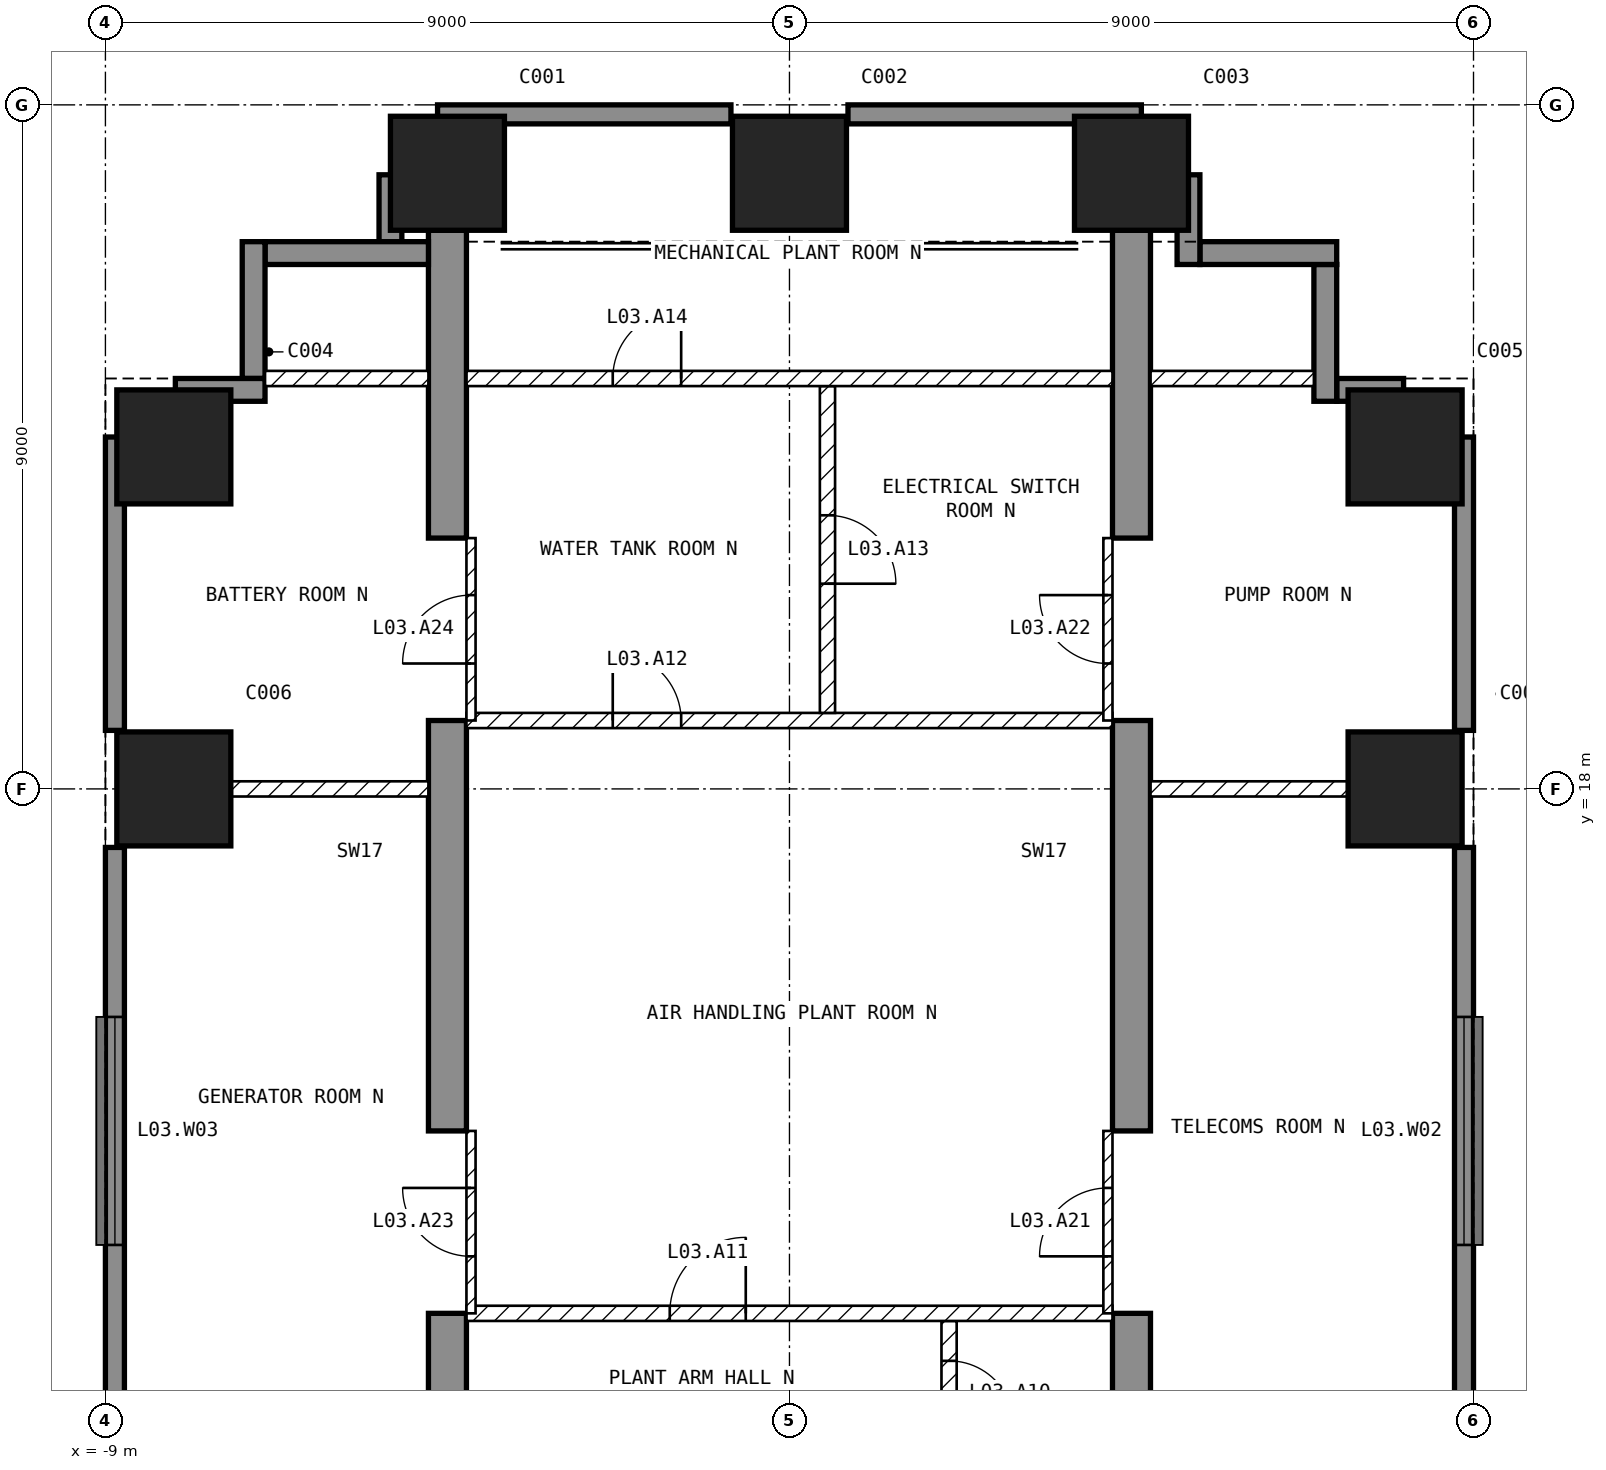
"""IFC4 building model, lengths in metres.
Left out: names, types, materials, properties, quantities, classifications, styles, units other than length and angle.
Written with IfcOpenShell. Run it as: python <this file> out.ifc"""

import sys

from ifc_helpers import new_model, si_unit, direction, frame, frame_2d, origin, origin_2d, place, context, subcontext, project, spatial, polyline, rectangle, outline, extrude, element, fill, save


model = new_model("IFC4")
c1 = context("Model", 3, precision=1e-05, world=origin(), true_north=direction((0.0, 1.0)))
c2 = subcontext(c1, "Body", "Model", "MODEL_VIEW")
j1 = project(units=[si_unit("LENGTHUNIT", "METRE"), si_unit("PLANEANGLEUNIT", "RADIAN")], contexts=[c1])
p1 = place(None, origin())
s1 = spatial("IfcSite", under=j1, at=p1, CompositionType="ELEMENT")
p2 = place(p1, origin())
s2 = spatial("IfcBuilding", under=s1, at=p2, CompositionType="ELEMENT")
p3 = place(p2, frame((0.0, 0.0, 27.0)))
s3 = spatial("IfcBuildingStorey", under=s2, at=p3, CompositionType="ELEMENT", Elevation=27.0)
for number, where, z_axis, x_axis in (
    (1, (-8.1, 18.0, -0.45), (0.0, 0.0, 1.0), (1.0, 0.0, 0.0)),
    (2, (-8.1, 22.5, -0.45), (0.0, 0.0, 1.0), (1.0, 0.0, 0.0)),
    (3, (-4.5, 26.1, -0.45), (0.0, 0.0, 1.0), (1.0, 0.0, 0.0)),
    (4, (0.0, 26.1, -0.45), (0.0, 0.0, 1.0), (1.0, 0.0, 0.0)),
    (5, (4.5, 26.1, -0.45), (0.0, 0.0, 1.0), (1.0, 0.0, 0.0)),
    (6, (8.1, 18.0, -0.45), (0.0, 0.0, 1.0), (1.0, 0.0, 0.0)),
    (7, (8.1, 22.5, -0.45), (0.0, 0.0, 1.0), (1.0, 0.0, 0.0)),
):
    element("IfcColumn", number, at=place(p3, frame(where, z_axis=z_axis, x_axis=x_axis)), inside=s3, PredefinedType="COLUMN", context=c2, shape_type="SweptSolid", body=[
        extrude(rectangle(XDim=1.5, YDim=1.5, at=origin_2d()), origin(), (0.0, 0.0, 1.0), 5.15),
    ])
for number, where, z_axis, x_axis in (
    (8, (-4.75, 9.0, -0.45), (1.0, 0.0, 0.0), (0.0, 1.0, 0.0)),
    (9, (4.25, 9.0, -0.45), (1.0, 0.0, 0.0), (0.0, 1.0, 0.0)),
):
    element("IfcWall", number, at=place(p3, frame(where, z_axis=z_axis, x_axis=x_axis)), inside=s3, PredefinedType="SHEAR", context=c2, shape_type="SweptSolid", body=[
        extrude(outline(polyline([(0.0, 0.0), (2.1, 0.0), (2.1, 2.85), (4.5, 2.85), (4.5, 0.0), (9.9, 0.0), (9.9, 2.85), (12.3, 2.85), (12.3, 0.0), (16.35, 0.0), (16.35, 5.15), (0.0, 5.15), (0.0, 0.0)])), origin(), (0.0, 0.0, 1.0), 0.5),
    ])
p4 = place(p3, frame((8.875, 9.77, 0.0), z_axis=(0.0, 0.0, 1.0), x_axis=(0.0, 1.0, 0.0)))
e10 = element("IfcWall", 10, at=p4, inside=s3, PredefinedType="SOLIDWALL", context=c2, shape_type="SweptSolid", body=[
    extrude(rectangle(XDim=7.46, YDim=0.25, at=frame_2d((3.73, 0.0))), origin(), (0.0, 0.0, 1.0), 4.7),
])
p5 = place(p4, frame((2.23, 0.0, 1.0)))
e11 = element("IfcOpeningElement", 11, at=p5, cuts=e10, PredefinedType="OPENING", context=c2, shape_type="SweptSolid", body=[
    extrude(rectangle(XDim=3.0, YDim=2.4, at=frame_2d((1.5, 1.2))), frame((0.0, 0.135, 0.0), z_axis=(0.0, -1.0, 0.0), x_axis=(1.0, 0.0, 0.0)), (0.0, 0.0, 1.0), 0.27),
])
for number, where, z_axis, x_axis in (
    (12, (8.875, 18.77, 0.0), (0.0, 0.0, 1.0), (0.0, 1.0, 0.0)),
    (13, (4.63, 26.875, 0.0), (0.0, 0.0, 1.0), (-1.0, 0.0, 0.0)),
    (14, (-0.77, 26.875, 0.0), (0.0, 0.0, 1.0), (-1.0, 0.0, 0.0)),
    (15, (-8.875, 22.63, 0.0), (0.0, 0.0, 1.0), (0.0, -1.0, 0.0)),
):
    element("IfcWall", number, at=place(p3, frame(where, z_axis=z_axis, x_axis=x_axis)), inside=s3, PredefinedType="SOLIDWALL", context=c2, shape_type="SweptSolid", body=[
        extrude(rectangle(XDim=3.86, YDim=0.25, at=frame_2d((1.93, 0.0))), origin(), (0.0, 0.0, 1.0), 4.7),
    ])
p6 = place(p3, frame((-8.875, 17.23, 0.0), z_axis=(0.0, 0.0, 1.0), x_axis=(0.0, -1.0, 0.0)))
e16 = element("IfcWall", 16, at=p6, inside=s3, PredefinedType="SOLIDWALL", context=c2, shape_type="SweptSolid", body=[
    extrude(rectangle(XDim=7.46, YDim=0.25, at=frame_2d((3.73, 0.0))), origin(), (0.0, 0.0, 1.0), 4.7),
])
p7 = place(p6, frame((2.23, 0.0, 1.0)))
e17 = element("IfcOpeningElement", 17, at=p7, cuts=e16, PredefinedType="OPENING", context=c2, shape_type="SweptSolid", body=[
    extrude(rectangle(XDim=3.0, YDim=2.4, at=frame_2d((1.5, 1.2))), frame((0.0, 0.135, 0.0), z_axis=(0.0, -1.0, 0.0), x_axis=(1.0, 0.0, 0.0)), (0.0, 0.0, 1.0), 0.27),
])
p8 = place(p3, frame((8.08, 23.25, 0.0), z_axis=(0.0, 0.0, 1.0), x_axis=(-1.0, 0.0, 0.0)))
e18 = element("IfcWall", 18, at=p8, inside=s3, PredefinedType="SOLIDWALL", context=c2, shape_type="SweptSolid", body=[
    extrude(rectangle(XDim=0.88, YDim=0.3, at=frame_2d((0.44, 0.0))), origin(), (0.0, 0.0, 1.0), 4.7),
])
p9 = place(p3, frame((7.05, 23.1, 0.0), z_axis=(0.0, 0.0, 1.0), x_axis=(0.0, 1.0, 0.0)))
e19 = element("IfcWall", 19, at=p9, inside=s3, PredefinedType="SOLIDWALL", context=c2, shape_type="SweptSolid", body=[
    extrude(rectangle(XDim=1.8, YDim=0.3, at=frame_2d((0.9, 0.0))), origin(), (0.0, 0.0, 1.0), 4.7),
])
p10 = place(p3, frame((7.2, 25.05, 0.0), z_axis=(0.0, 0.0, 1.0), x_axis=(-1.0, 0.0, 0.0)))
e20 = element("IfcWall", 20, at=p10, inside=s3, PredefinedType="SOLIDWALL", context=c2, shape_type="SweptSolid", body=[
    extrude(rectangle(XDim=1.8, YDim=0.3, at=frame_2d((0.9, 0.0))), origin(), (0.0, 0.0, 1.0), 4.7),
])
p11 = place(p3, frame((5.25, 24.9, 0.0), z_axis=(0.0, 0.0, 1.0), x_axis=(0.0, 1.0, 0.0)))
e21 = element("IfcWall", 21, at=p11, inside=s3, PredefinedType="SOLIDWALL", context=c2, shape_type="SweptSolid", body=[
    extrude(rectangle(XDim=1.18, YDim=0.3, at=frame_2d((0.59, 0.0))), origin(), (0.0, 0.0, 1.0), 4.7),
])
p12 = place(p3, frame((-5.25, 26.08, 0.0), z_axis=(0.0, 0.0, 1.0), x_axis=(0.0, -1.0, 0.0)))
e22 = element("IfcWall", 22, at=p12, inside=s3, PredefinedType="SOLIDWALL", context=c2, shape_type="SweptSolid", body=[
    extrude(rectangle(XDim=0.88, YDim=0.3, at=frame_2d((0.44, 0.0))), origin(), (0.0, 0.0, 1.0), 4.7),
])
p13 = place(p3, frame((-4.75, 25.05, 0.0), z_axis=(0.0, 0.0, 1.0), x_axis=(-1.0, 0.0, 0.0)))
e23 = element("IfcWall", 23, at=p13, inside=s3, PredefinedType="SOLIDWALL", context=c2, shape_type="SweptSolid", body=[
    extrude(rectangle(XDim=2.15, YDim=0.3, at=frame_2d((1.075, 0.0))), origin(), (0.0, 0.0, 1.0), 4.7),
])
p14 = place(p3, frame((-7.05, 25.2, 0.0), z_axis=(0.0, 0.0, 1.0), x_axis=(0.0, -1.0, 0.0)))
e24 = element("IfcWall", 24, at=p14, inside=s3, PredefinedType="SOLIDWALL", context=c2, shape_type="SweptSolid", body=[
    extrude(rectangle(XDim=1.8, YDim=0.3, at=frame_2d((0.9, 0.0))), origin(), (0.0, 0.0, 1.0), 4.7),
])
p15 = place(p3, frame((-6.9, 23.25, 0.0), z_axis=(0.0, 0.0, 1.0), x_axis=(-1.0, 0.0, 0.0)))
e25 = element("IfcWall", 25, at=p15, inside=s3, PredefinedType="SOLIDWALL", context=c2, shape_type="SweptSolid", body=[
    extrude(rectangle(XDim=1.18, YDim=0.3, at=frame_2d((0.59, 0.0))), origin(), (0.0, 0.0, 1.0), 4.7),
])
p16 = place(p3, frame((2.1, 11.0, 0.0), z_axis=(0.0, 0.0, 1.0), x_axis=(0.0, -1.0, 0.0)))
e26 = element("IfcWall", 26, at=p16, inside=s3, PredefinedType="PARTITIONING", context=c2, shape_type="SweptSolid", body=[
    extrude(rectangle(XDim=1.9, YDim=0.2, at=frame_2d((0.95, 0.0))), origin(), (0.0, 0.0, 1.0), 4.7),
])
p17 = place(p16, frame((0.525, 0.0, 0.0)))
e27 = element("IfcOpeningElement", 27, at=p17, cuts=e26, PredefinedType="OPENING", context=c2, shape_type="SweptSolid", body=[
    extrude(rectangle(XDim=0.85, YDim=2.1, at=frame_2d((0.425, 1.05))), frame((0.0, 0.11, 0.0), z_axis=(0.0, -1.0, 0.0), x_axis=(1.0, 0.0, 0.0)), (0.0, 0.0, 1.0), 0.22),
])
p18 = place(p3, frame((-4.25, 11.1, 0.0), z_axis=(0.0, 0.0, 1.0), x_axis=(1.0, 0.0, 0.0)))
e28 = element("IfcWall", 28, at=p18, inside=s3, PredefinedType="PARTITIONING", context=c2, shape_type="SweptSolid", body=[
    extrude(rectangle(XDim=8.5, YDim=0.2, at=frame_2d((4.25, 0.0))), origin(), (0.0, 0.0, 1.0), 4.7),
])
p19 = place(p18, frame((2.675, 0.0, 0.0)))
e29 = element("IfcOpeningElement", 29, at=p19, cuts=e28, PredefinedType="OPENING", context=c2, shape_type="SweptSolid", body=[
    extrude(rectangle(XDim=1.0, YDim=2.1, at=frame_2d((0.5, 1.05))), frame((0.0, 0.11, 0.0), z_axis=(0.0, -1.0, 0.0), x_axis=(1.0, 0.0, 0.0)), (0.0, 0.0, 1.0), 0.22),
])
p20 = place(p3, frame((-4.25, 18.9, 0.0), z_axis=(0.0, 0.0, 1.0), x_axis=(1.0, 0.0, 0.0)))
e30 = element("IfcWall", 30, at=p20, inside=s3, PredefinedType="PARTITIONING", context=c2, shape_type="SweptSolid", body=[
    extrude(rectangle(XDim=8.5, YDim=0.2, at=frame_2d((4.25, 0.0))), origin(), (0.0, 0.0, 1.0), 4.7),
])
p21 = place(p20, frame((1.925, 0.0, 0.0)))
e31 = element("IfcOpeningElement", 31, at=p21, cuts=e30, PredefinedType="OPENING", context=c2, shape_type="SweptSolid", body=[
    extrude(rectangle(XDim=0.9, YDim=2.1, at=frame_2d((0.45, 1.05))), frame((0.0, 0.11, 0.0), z_axis=(0.0, -1.0, 0.0), x_axis=(1.0, 0.0, 0.0)), (0.0, 0.0, 1.0), 0.22),
])
p22 = place(p3, frame((0.5, 23.3, 0.0), z_axis=(0.0, 0.0, 1.0), x_axis=(0.0, -1.0, 0.0)))
e32 = element("IfcWall", 32, at=p22, inside=s3, PredefinedType="PARTITIONING", context=c2, shape_type="SweptSolid", body=[
    extrude(rectangle(XDim=4.3, YDim=0.2, at=frame_2d((2.15, 0.0))), origin(), (0.0, 0.0, 1.0), 4.7),
])
p23 = place(p22, frame((1.7, 0.0, 0.0)))
e33 = element("IfcOpeningElement", 33, at=p23, cuts=e32, PredefinedType="OPENING", context=c2, shape_type="SweptSolid", body=[
    extrude(rectangle(XDim=0.9, YDim=2.1, at=frame_2d((0.45, 1.05))), frame((0.0, 0.11, 0.0), z_axis=(0.0, -1.0, 0.0), x_axis=(1.0, 0.0, 0.0)), (0.0, 0.0, 1.0), 0.22),
])
p24 = place(p3, frame((-4.25, 23.4, 0.0), z_axis=(0.0, 0.0, 1.0), x_axis=(1.0, 0.0, 0.0)))
e34 = element("IfcWall", 34, at=p24, inside=s3, PredefinedType="PARTITIONING", context=c2, shape_type="SweptSolid", body=[
    extrude(rectangle(XDim=8.5, YDim=0.2, at=frame_2d((4.25, 0.0))), origin(), (0.0, 0.0, 1.0), 4.7),
])
p25 = place(p24, frame((1.925, 0.0, 0.0)))
e35 = element("IfcOpeningElement", 35, at=p25, cuts=e34, PredefinedType="OPENING", context=c2, shape_type="SweptSolid", body=[
    extrude(rectangle(XDim=0.9, YDim=2.1, at=frame_2d((0.45, 1.05))), frame((0.0, 0.11, 0.0), z_axis=(0.0, -1.0, 0.0), x_axis=(1.0, 0.0, 0.0)), (0.0, 0.0, 1.0), 0.22),
])
p26 = place(p3, frame((4.75, 18.0, 0.0), z_axis=(0.0, 0.0, 1.0), x_axis=(1.0, 0.0, 0.0)))
e36 = element("IfcWall", 36, at=p26, inside=s3, PredefinedType="PARTITIONING", context=c2, shape_type="SweptSolid", body=[
    extrude(rectangle(XDim=2.6, YDim=0.2, at=frame_2d((1.3, 0.0))), origin(), (0.0, 0.0, 1.0), 3.72),
])
p27 = place(p3, frame((4.75, 23.4, 0.0), z_axis=(0.0, 0.0, 1.0), x_axis=(1.0, 0.0, 0.0)))
e37 = element("IfcWall", 37, at=p27, inside=s3, PredefinedType="PARTITIONING", context=c2, shape_type="SweptSolid", body=[
    extrude(rectangle(XDim=2.15, YDim=0.2, at=frame_2d((1.075, 0.0))), origin(), (0.0, 0.0, 1.0), 4.7),
])
p28 = place(p3, frame((-7.35, 18.0, 0.0), z_axis=(0.0, 0.0, 1.0), x_axis=(1.0, 0.0, 0.0)))
e38 = element("IfcWall", 38, at=p28, inside=s3, PredefinedType="PARTITIONING", context=c2, shape_type="SweptSolid", body=[
    extrude(rectangle(XDim=2.6, YDim=0.2, at=frame_2d((1.3, 0.0))), origin(), (0.0, 0.0, 1.0), 3.72),
])
p29 = place(p3, frame((-6.9, 23.4, 0.0), z_axis=(0.0, 0.0, 1.0), x_axis=(1.0, 0.0, 0.0)))
e39 = element("IfcWall", 39, at=p29, inside=s3, PredefinedType="PARTITIONING", context=c2, shape_type="SweptSolid", body=[
    extrude(rectangle(XDim=2.15, YDim=0.2, at=frame_2d((1.075, 0.0))), origin(), (0.0, 0.0, 1.0), 4.7),
])
p30 = place(p3, frame((4.19, 11.1, 0.0), z_axis=(0.0, 0.0, 1.0), x_axis=(0.0, 1.0, 0.0)))
e40 = element("IfcWall", 40, at=p30, inside=s3, PredefinedType="PARTITIONING", context=c2, shape_type="SweptSolid", body=[
    extrude(rectangle(XDim=2.4, YDim=0.12, at=frame_2d((1.2, 0.0))), origin(), (0.0, 0.0, 1.0), 2.4),
])
p31 = place(p30, frame((0.75, 0.0, 0.0)))
e41 = element("IfcOpeningElement", 41, at=p31, cuts=e40, PredefinedType="OPENING", context=c2, shape_type="SweptSolid", body=[
    extrude(rectangle(XDim=0.9, YDim=2.1, at=frame_2d((0.45, 1.05))), frame((0.0, 0.07, 0.0), z_axis=(0.0, -1.0, 0.0), x_axis=(1.0, 0.0, 0.0)), (0.0, 0.0, 1.0), 0.14),
])
p32 = place(p3, frame((4.19, 18.9, 0.0), z_axis=(0.0, 0.0, 1.0), x_axis=(0.0, 1.0, 0.0)))
e42 = element("IfcWall", 42, at=p32, inside=s3, PredefinedType="PARTITIONING", context=c2, shape_type="SweptSolid", body=[
    extrude(rectangle(XDim=2.4, YDim=0.12, at=frame_2d((1.2, 0.0))), origin(), (0.0, 0.0, 1.0), 2.4),
])
p33 = place(p32, frame((0.75, 0.0, 0.0)))
e43 = element("IfcOpeningElement", 43, at=p33, cuts=e42, PredefinedType="OPENING", context=c2, shape_type="SweptSolid", body=[
    extrude(rectangle(XDim=0.9, YDim=2.1, at=frame_2d((0.45, 1.05))), frame((0.0, 0.07, 0.0), z_axis=(0.0, -1.0, 0.0), x_axis=(1.0, 0.0, 0.0)), (0.0, 0.0, 1.0), 0.14),
])
p34 = place(p3, frame((-4.19, 11.1, 0.0), z_axis=(0.0, 0.0, 1.0), x_axis=(0.0, 1.0, 0.0)))
e44 = element("IfcWall", 44, at=p34, inside=s3, PredefinedType="PARTITIONING", context=c2, shape_type="SweptSolid", body=[
    extrude(rectangle(XDim=2.4, YDim=0.12, at=frame_2d((1.2, 0.0))), origin(), (0.0, 0.0, 1.0), 2.4),
])
p35 = place(p34, frame((0.75, 0.0, 0.0)))
e45 = element("IfcOpeningElement", 45, at=p35, cuts=e44, PredefinedType="OPENING", context=c2, shape_type="SweptSolid", body=[
    extrude(rectangle(XDim=0.9, YDim=2.1, at=frame_2d((0.45, 1.05))), frame((0.0, 0.07, 0.0), z_axis=(0.0, -1.0, 0.0), x_axis=(1.0, 0.0, 0.0)), (0.0, 0.0, 1.0), 0.14),
])
p36 = place(p3, frame((-4.19, 18.9, 0.0), z_axis=(0.0, 0.0, 1.0), x_axis=(0.0, 1.0, 0.0)))
e46 = element("IfcWall", 46, at=p36, inside=s3, PredefinedType="PARTITIONING", context=c2, shape_type="SweptSolid", body=[
    extrude(rectangle(XDim=2.4, YDim=0.12, at=frame_2d((1.2, 0.0))), origin(), (0.0, 0.0, 1.0), 2.4),
])
p37 = place(p36, frame((0.75, 0.0, 0.0)))
e47 = element("IfcOpeningElement", 47, at=p37, cuts=e46, PredefinedType="OPENING", context=c2, shape_type="SweptSolid", body=[
    extrude(rectangle(XDim=0.9, YDim=2.1, at=frame_2d((0.45, 1.05))), frame((0.0, 0.07, 0.0), z_axis=(0.0, -1.0, 0.0), x_axis=(1.0, 0.0, 0.0)), (0.0, 0.0, 1.0), 0.14),
])
p38 = place(p5, origin())
e48 = element("IfcWindow", 48, at=p38, inside=s3, PartitioningType="SINGLE_PANEL", PredefinedType="WINDOW", context=c2, shape_type="SweptSolid", body=[
    extrude(rectangle(XDim=3.0, YDim=2.4, at=frame_2d((1.5, 1.2))), frame((0.0, 0.03, 0.0), z_axis=(0.0, -1.0, 0.0), x_axis=(1.0, 0.0, 0.0)), (0.0, 0.0, 1.0), 0.06),
])
fill(e11, e48)
p39 = place(p7, origin())
e49 = element("IfcWindow", 49, at=p39, inside=s3, PartitioningType="SINGLE_PANEL", PredefinedType="WINDOW", context=c2, shape_type="SweptSolid", body=[
    extrude(rectangle(XDim=3.0, YDim=2.4, at=frame_2d((1.5, 1.2))), frame((0.0, 0.03, 0.0), z_axis=(0.0, -1.0, 0.0), x_axis=(1.0, 0.0, 0.0)), (0.0, 0.0, 1.0), 0.06),
])
fill(e17, e49)
p40 = place(p17, origin())
e50 = element("IfcDoor", 50, at=p40, inside=s3, OperationType="SINGLE_SWING_RIGHT", PredefinedType="DOOR", context=c2, shape_type="SweptSolid", body=[
    extrude(rectangle(XDim=0.85, YDim=2.1, at=frame_2d((0.425, 1.05))), frame((0.0, 0.025, 0.0), z_axis=(0.0, -1.0, 0.0), x_axis=(1.0, 0.0, 0.0)), (0.0, 0.0, 1.0), 0.05),
])
fill(e27, e50)
p41 = place(p19, origin())
e51 = element("IfcDoor", 51, at=p41, inside=s3, OperationType="SINGLE_SWING_RIGHT", PredefinedType="DOOR", context=c2, shape_type="SweptSolid", body=[
    extrude(rectangle(XDim=1.0, YDim=2.1, at=frame_2d((0.5, 1.05))), frame((0.0, 0.025, 0.0), z_axis=(0.0, -1.0, 0.0), x_axis=(1.0, 0.0, 0.0)), (0.0, 0.0, 1.0), 0.05),
])
fill(e29, e51)
p42 = place(p21, origin())
e52 = element("IfcDoor", 52, at=p42, inside=s3, OperationType="SINGLE_SWING_LEFT", PredefinedType="DOOR", context=c2, shape_type="SweptSolid", body=[
    extrude(rectangle(XDim=0.9, YDim=2.1, at=frame_2d((0.45, 1.05))), frame((0.0, 0.025, 0.0), z_axis=(0.0, -1.0, 0.0), x_axis=(1.0, 0.0, 0.0)), (0.0, 0.0, 1.0), 0.05),
])
fill(e31, e52)
p43 = place(p23, origin())
e53 = element("IfcDoor", 53, at=p43, inside=s3, OperationType="SINGLE_SWING_RIGHT", PredefinedType="DOOR", context=c2, shape_type="SweptSolid", body=[
    extrude(rectangle(XDim=0.9, YDim=2.1, at=frame_2d((0.45, 1.05))), frame((0.0, 0.025, 0.0), z_axis=(0.0, -1.0, 0.0), x_axis=(1.0, 0.0, 0.0)), (0.0, 0.0, 1.0), 0.05),
])
fill(e33, e53)
p44 = place(p25, origin())
e54 = element("IfcDoor", 54, at=p44, inside=s3, OperationType="SINGLE_SWING_RIGHT", PredefinedType="DOOR", context=c2, shape_type="SweptSolid", body=[
    extrude(rectangle(XDim=0.9, YDim=2.1, at=frame_2d((0.45, 1.05))), frame((0.0, 0.025, 0.0), z_axis=(0.0, -1.0, 0.0), x_axis=(1.0, 0.0, 0.0)), (0.0, 0.0, 1.0), 0.05),
])
fill(e35, e54)
p45 = place(p31, origin())
e55 = element("IfcDoor", 55, at=p45, inside=s3, OperationType="SINGLE_SWING_LEFT", PredefinedType="DOOR", context=c2, shape_type="SweptSolid", body=[
    extrude(rectangle(XDim=0.9, YDim=2.1, at=frame_2d((0.45, 1.05))), frame((0.0, 0.025, 0.0), z_axis=(0.0, -1.0, 0.0), x_axis=(1.0, 0.0, 0.0)), (0.0, 0.0, 1.0), 0.05),
])
fill(e41, e55)
p46 = place(p33, origin())
e56 = element("IfcDoor", 56, at=p46, inside=s3, OperationType="SINGLE_SWING_RIGHT", PredefinedType="DOOR", context=c2, shape_type="SweptSolid", body=[
    extrude(rectangle(XDim=0.9, YDim=2.1, at=frame_2d((0.45, 1.05))), frame((0.0, 0.025, 0.0), z_axis=(0.0, -1.0, 0.0), x_axis=(1.0, 0.0, 0.0)), (0.0, 0.0, 1.0), 0.05),
])
fill(e43, e56)
p47 = place(p35, origin())
e57 = element("IfcDoor", 57, at=p47, inside=s3, OperationType="SINGLE_SWING_RIGHT", PredefinedType="DOOR", context=c2, shape_type="SweptSolid", body=[
    extrude(rectangle(XDim=0.9, YDim=2.1, at=frame_2d((0.45, 1.05))), frame((0.0, 0.025, 0.0), z_axis=(0.0, -1.0, 0.0), x_axis=(1.0, 0.0, 0.0)), (0.0, 0.0, 1.0), 0.05),
])
fill(e45, e57)
p48 = place(p37, origin())
e58 = element("IfcDoor", 58, at=p48, inside=s3, OperationType="SINGLE_SWING_LEFT", PredefinedType="DOOR", context=c2, shape_type="SweptSolid", body=[
    extrude(rectangle(XDim=0.9, YDim=2.1, at=frame_2d((0.45, 1.05))), frame((0.0, 0.025, 0.0), z_axis=(0.0, -1.0, 0.0), x_axis=(1.0, 0.0, 0.0)), (0.0, 0.0, 1.0), 0.05),
])
fill(e47, e58)
save(model, sys.argv[1])
